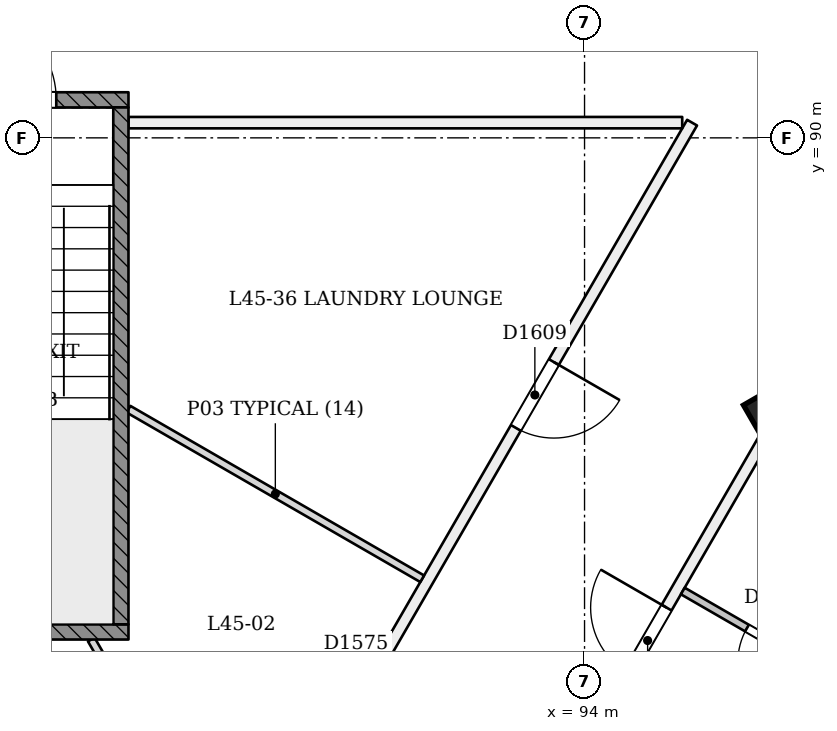
"""IFC4 building model, lengths in metres.
Left out: names, types, materials, properties, quantities, classifications, styles, units other than length and angle.
Written with IfcOpenShell. Run it as: python <this file> out.ifc"""

import sys

from ifc_helpers import new_model, si_unit, direction, frame, frame_2d, origin, origin_2d, place, context, subcontext, project, spatial, rectangle, extrude, element, fill, save


model = new_model("IFC4")
c1 = context("Model", 3, precision=1e-05, world=origin(), true_north=direction((0.0, 1.0)))
c2 = subcontext(c1, "Body", "Model", "MODEL_VIEW")
j1 = project(units=[si_unit("LENGTHUNIT", "METRE"), si_unit("PLANEANGLEUNIT", "RADIAN")], contexts=[c1])
p1 = place(None, origin())
s1 = spatial("IfcSite", under=j1, at=p1, CompositionType="ELEMENT")
p2 = place(p1, origin())
s2 = spatial("IfcBuilding", under=s1, at=p2, CompositionType="ELEMENT")
p3 = place(p2, frame((0.0, 0.0, 174.6)))
s3 = spatial("IfcBuildingStorey", under=s2, at=p3, CompositionType="ELEMENT", Elevation=174.6)
p4 = place(p3, frame((96.528, 86.327, -0.018), z_axis=(-0.022221406801, 0.038413224561, 0.999014831351), x_axis=(-0.499508300569, -0.866024890386, 0.022188891243)))
e1 = element("IfcColumn", 1, at=p4, inside=s3, PredefinedType="COLUMN", context=c2, shape_type="SweptSolid", body=[
    extrude(rectangle(XDim=0.6, YDim=0.6, at=origin_2d()), origin(), (0.0, 0.0, 1.0), 3.604),
])
p5 = place(p3, frame((95.415, 90.2, 0.0), z_axis=(0.0, 0.0, 1.0), x_axis=(-0.500002869824, -0.866023746885, 0.0)))
e2 = element("IfcWall", 2, at=p5, inside=s3, PredefinedType="PARTITIONING", context=c2, shape_type="SweptSolid", body=[
    extrude(rectangle(XDim=20.7, YDim=0.15, at=frame_2d((10.35, 0.0))), origin(), (0.0, 0.0, 1.0), 3.15),
])
p6 = place(p5, frame((8.391, 0.0, 0.0)))
e3 = element("IfcOpeningElement", 3, at=p6, cuts=e2, PredefinedType="OPENING", context=c2, shape_type="SweptSolid", body=[
    extrude(rectangle(XDim=0.9, YDim=2.1, at=frame_2d((0.45, 1.05))), frame((0.0, 0.085, 0.0), z_axis=(0.0, -1.0, 0.0), x_axis=(1.0, 0.0, 0.0)), (0.0, 0.0, 1.0), 0.171),
])
p7 = place(p5, frame((3.637, 0.0, 0.0)))
e4 = element("IfcOpeningElement", 4, at=p7, cuts=e2, PredefinedType="OPENING", context=c2, shape_type="SweptSolid", body=[
    extrude(rectangle(XDim=1.0, YDim=2.1, at=frame_2d((0.5, 1.05))), frame((0.0, 0.085, 0.0), z_axis=(0.0, -1.0, 0.0), x_axis=(1.0, 0.0, 0.0)), (0.0, 0.0, 1.0), 0.171),
])
p8 = place(p5, frame((12.351, 0.0, 0.0)))
e5 = element("IfcOpeningElement", 5, at=p8, cuts=e2, PredefinedType="OPENING", context=c2, shape_type="SweptSolid", body=[
    extrude(rectangle(XDim=1.0, YDim=2.1, at=frame_2d((0.5, 1.05))), frame((0.0, 0.085, 0.0), z_axis=(0.0, -1.0, 0.0), x_axis=(1.0, 0.0, 0.0)), (0.0, 0.0, 1.0), 0.171),
])
p9 = place(p3, frame((85.065, 66.473, 0.0), z_axis=(0.0, 0.0, 1.0), x_axis=(0.500005289472, 0.866022349885, 0.0)))
e6 = element("IfcWall", 6, at=p9, inside=s3, PredefinedType="PARTITIONING", context=c2, shape_type="SweptSolid", body=[
    extrude(rectangle(XDim=27.397, YDim=0.15, at=frame_2d((13.699, 0.0))), origin(), (0.0, 0.0, 1.0), 2.75),
])
p10 = place(p9, frame((1.03, 0.0, 0.0)))
e7 = element("IfcOpeningElement", 7, at=p10, cuts=e6, PredefinedType="OPENING", context=c2, shape_type="SweptSolid", body=[
    extrude(rectangle(XDim=1.0, YDim=2.1, at=frame_2d((0.5, 1.05))), frame((0.0, 0.085, 0.0), z_axis=(0.0, -1.0, 0.0), x_axis=(1.0, 0.0, 0.0)), (0.0, 0.0, 1.0), 0.171),
])
p11 = place(p9, frame((7.821, 0.0, 0.0)))
e8 = element("IfcOpeningElement", 8, at=p11, cuts=e6, PredefinedType="OPENING", context=c2, shape_type="SweptSolid", body=[
    extrude(rectangle(XDim=1.0, YDim=2.1, at=frame_2d((0.5, 1.05))), frame((0.0, 0.085, 0.0), z_axis=(0.0, -1.0, 0.0), x_axis=(1.0, 0.0, 0.0)), (0.0, 0.0, 1.0), 0.171),
])
p12 = place(p9, frame((10.03, 0.0, 0.0)))
e9 = element("IfcOpeningElement", 9, at=p12, cuts=e6, PredefinedType="OPENING", context=c2, shape_type="SweptSolid", body=[
    extrude(rectangle(XDim=1.0, YDim=2.1, at=frame_2d((0.5, 1.05))), frame((0.0, 0.085, 0.0), z_axis=(0.0, -1.0, 0.0), x_axis=(1.0, 0.0, 0.0)), (0.0, 0.0, 1.0), 0.171),
])
p13 = place(p9, frame((16.821, 0.0, 0.0)))
e10 = element("IfcOpeningElement", 10, at=p13, cuts=e6, PredefinedType="OPENING", context=c2, shape_type="SweptSolid", body=[
    extrude(rectangle(XDim=1.0, YDim=2.1, at=frame_2d((0.5, 1.05))), frame((0.0, 0.085, 0.0), z_axis=(0.0, -1.0, 0.0), x_axis=(1.0, 0.0, 0.0)), (0.0, 0.0, 1.0), 0.171),
])
p14 = place(p9, frame((19.03, 0.0, 0.0)))
e11 = element("IfcOpeningElement", 11, at=p14, cuts=e6, PredefinedType="OPENING", context=c2, shape_type="SweptSolid", body=[
    extrude(rectangle(XDim=1.0, YDim=2.1, at=frame_2d((0.5, 1.05))), frame((0.0, 0.085, 0.0), z_axis=(0.0, -1.0, 0.0), x_axis=(1.0, 0.0, 0.0)), (0.0, 0.0, 1.0), 0.171),
])
p15 = place(p9, frame((25.912, 0.0, 0.0)))
e12 = element("IfcOpeningElement", 12, at=p15, cuts=e6, PredefinedType="OPENING", context=c2, shape_type="SweptSolid", body=[
    extrude(rectangle(XDim=1.2, YDim=2.1, at=frame_2d((0.6, 1.05))), frame((0.0, 0.085, 0.0), z_axis=(0.0, -1.0, 0.0), x_axis=(1.0, 0.0, 0.0)), (0.0, 0.0, 1.0), 0.171),
])
p16 = place(p3, frame((88.0, 90.2, 0.0), z_axis=(0.0, 0.0, 1.0), x_axis=(1.0, 0.0, 0.0)))
e13 = element("IfcWall", 13, at=p16, inside=s3, PredefinedType="PARTITIONING", context=c2, shape_type="SweptSolid", body=[
    extrude(rectangle(XDim=7.285, YDim=0.15, at=frame_2d((3.643, 0.0))), origin(), (0.0, 0.0, 1.0), 3.15),
])
p17 = place(p3, frame((91.864, 84.199, 0.0), z_axis=(0.0, 0.0, 1.0), x_axis=(-0.866018833748, 0.500011379465, 0.0)))
e14 = element("IfcWall", 14, at=p17, inside=s3, PredefinedType="PARTITIONING", context=c2, shape_type="SweptSolid", body=[
    extrude(rectangle(XDim=4.462, YDim=0.1, at=frame_2d((2.231, 0.0))), origin(), (0.0, 0.0, 1.0), 3.15),
])
p18 = place(p3, frame((87.51, 83.4, 0.0), z_axis=(0.0, 0.0, 1.0), x_axis=(0.499979582667, -0.866037191416, 0.0)))
e15 = element("IfcWall", 15, at=p18, inside=s3, PredefinedType="PARTITIONING", context=c2, shape_type="SweptSolid", body=[
    extrude(rectangle(XDim=3.863, YDim=0.1, at=frame_2d((1.932, 0.0))), origin(), (0.0, 0.0, 1.0), 3.15),
])
p19 = place(p3, frame((97.826, 82.576, 0.0), z_axis=(0.0, 0.0, 1.0), x_axis=(-0.866046596414, 0.499963291492, 0.0)))
e16 = element("IfcWall", 16, at=p19, inside=s3, PredefinedType="PARTITIONING", context=c2, shape_type="SweptSolid", body=[
    extrude(rectangle(XDim=2.925, YDim=0.1, at=frame_2d((1.462, 0.0))), origin(), (0.0, 0.0, 1.0), 3.15),
])
p20 = place(p19, frame((1.05, 0.0, 0.0)))
e17 = element("IfcOpeningElement", 17, at=p20, cuts=e16, PredefinedType="OPENING", context=c2, shape_type="SweptSolid", body=[
    extrude(rectangle(XDim=0.9, YDim=2.1, at=frame_2d((0.45, 1.05))), frame((0.0, 0.061, 0.0), z_axis=(0.0, -1.0, 0.0), x_axis=(1.0, 0.0, 0.0)), (0.0, 0.0, 1.0), 0.121),
])
p21 = place(p3, frame((82.0, 90.5, 0.0), z_axis=(0.0, 0.0, 1.0), x_axis=(1.0, 0.0, 0.0)))
e18 = element("IfcWall", 18, at=p21, inside=s3, PredefinedType="SOLIDWALL", context=c2, shape_type="SweptSolid", body=[
    extrude(rectangle(XDim=6.0, YDim=0.2, at=frame_2d((3.0, 0.0))), origin(), (0.0, 0.0, 1.0), 3.15),
])
p22 = place(p21, frame((0.95, 0.0, 0.0)))
e19 = element("IfcOpeningElement", 19, at=p22, cuts=e18, PredefinedType="OPENING", context=c2, shape_type="SweptSolid", body=[
    extrude(rectangle(XDim=1.2, YDim=2.1, at=frame_2d((0.6, 1.05))), frame((0.0, 0.11, 0.0), z_axis=(0.0, -1.0, 0.0), x_axis=(1.0, 0.0, 0.0)), (0.0, 0.0, 1.0), 0.221),
])
p23 = place(p21, frame((3.85, 0.0, 0.0)))
e20 = element("IfcOpeningElement", 20, at=p23, cuts=e18, PredefinedType="OPENING", context=c2, shape_type="SweptSolid", body=[
    extrude(rectangle(XDim=1.2, YDim=2.1, at=frame_2d((0.6, 1.05))), frame((0.0, 0.11, 0.0), z_axis=(0.0, -1.0, 0.0), x_axis=(1.0, 0.0, 0.0)), (0.0, 0.0, 1.0), 0.221),
])
p24 = place(p3, frame((82.0, 83.5, 0.0), z_axis=(0.0, 0.0, 1.0), x_axis=(1.0, 0.0, 0.0)))
e21 = element("IfcWall", 21, at=p24, inside=s3, PredefinedType="SOLIDWALL", context=c2, shape_type="SweptSolid", body=[
    extrude(rectangle(XDim=6.0, YDim=0.2, at=frame_2d((3.0, 0.0))), origin(), (0.0, 0.0, 1.0), 3.15),
])
p25 = place(p3, frame((87.9, 83.6, 0.0), z_axis=(0.0, 0.0, 1.0), x_axis=(0.0, 1.0, 0.0)))
e22 = element("IfcWall", 22, at=p25, inside=s3, PredefinedType="SOLIDWALL", context=c2, shape_type="SweptSolid", body=[
    extrude(rectangle(XDim=6.8, YDim=0.2, at=frame_2d((3.4, 0.0))), origin(), (0.0, 0.0, 1.0), 3.15),
])
p26 = place(p14, origin())
e23 = element("IfcDoor", 23, at=p26, inside=s3, OperationType="SINGLE_SWING_RIGHT", PredefinedType="NOTDEFINED", context=c2, shape_type="SweptSolid", body=[
    extrude(rectangle(XDim=1.0, YDim=2.1, at=frame_2d((0.5, 1.05))), frame((0.0, 0.025, 0.0), z_axis=(0.0, -1.0, 0.0), x_axis=(1.0, 0.0, 0.0)), (0.0, 0.0, 1.0), 0.05),
])
fill(e11, e23)
p27 = place(p20, origin())
e24 = element("IfcDoor", 24, at=p27, inside=s3, OperationType="SINGLE_SWING_LEFT", PredefinedType="NOTDEFINED", context=c2, shape_type="SweptSolid", body=[
    extrude(rectangle(XDim=0.9, YDim=2.1, at=frame_2d((0.45, 1.05))), frame((0.0, 0.025, 0.0), z_axis=(0.0, -1.0, 0.0), x_axis=(1.0, 0.0, 0.0)), (0.0, 0.0, 1.0), 0.05),
])
fill(e17, e24)
p28 = place(p7, origin())
e25 = element("IfcDoor", 25, at=p28, inside=s3, OperationType="SINGLE_SWING_LEFT", PredefinedType="NOTDEFINED", context=c2, shape_type="SweptSolid", body=[
    extrude(rectangle(XDim=1.0, YDim=2.1, at=frame_2d((0.5, 1.05))), frame((0.0, 0.025, 0.0), z_axis=(0.0, -1.0, 0.0), x_axis=(1.0, 0.0, 0.0)), (0.0, 0.0, 1.0), 0.05),
])
fill(e4, e25)
p29 = place(p23, origin())
e26 = element("IfcDoor", 26, at=p29, inside=s3, OperationType="SINGLE_SWING_LEFT", PredefinedType="NOTDEFINED", context=c2, shape_type="SweptSolid", body=[
    extrude(rectangle(XDim=1.2, YDim=2.1, at=frame_2d((0.6, 1.05))), frame((0.0, 0.025, 0.0), z_axis=(0.0, -1.0, 0.0), x_axis=(1.0, 0.0, 0.0)), (0.0, 0.0, 1.0), 0.05),
])
fill(e20, e26)
save(model, sys.argv[1])
